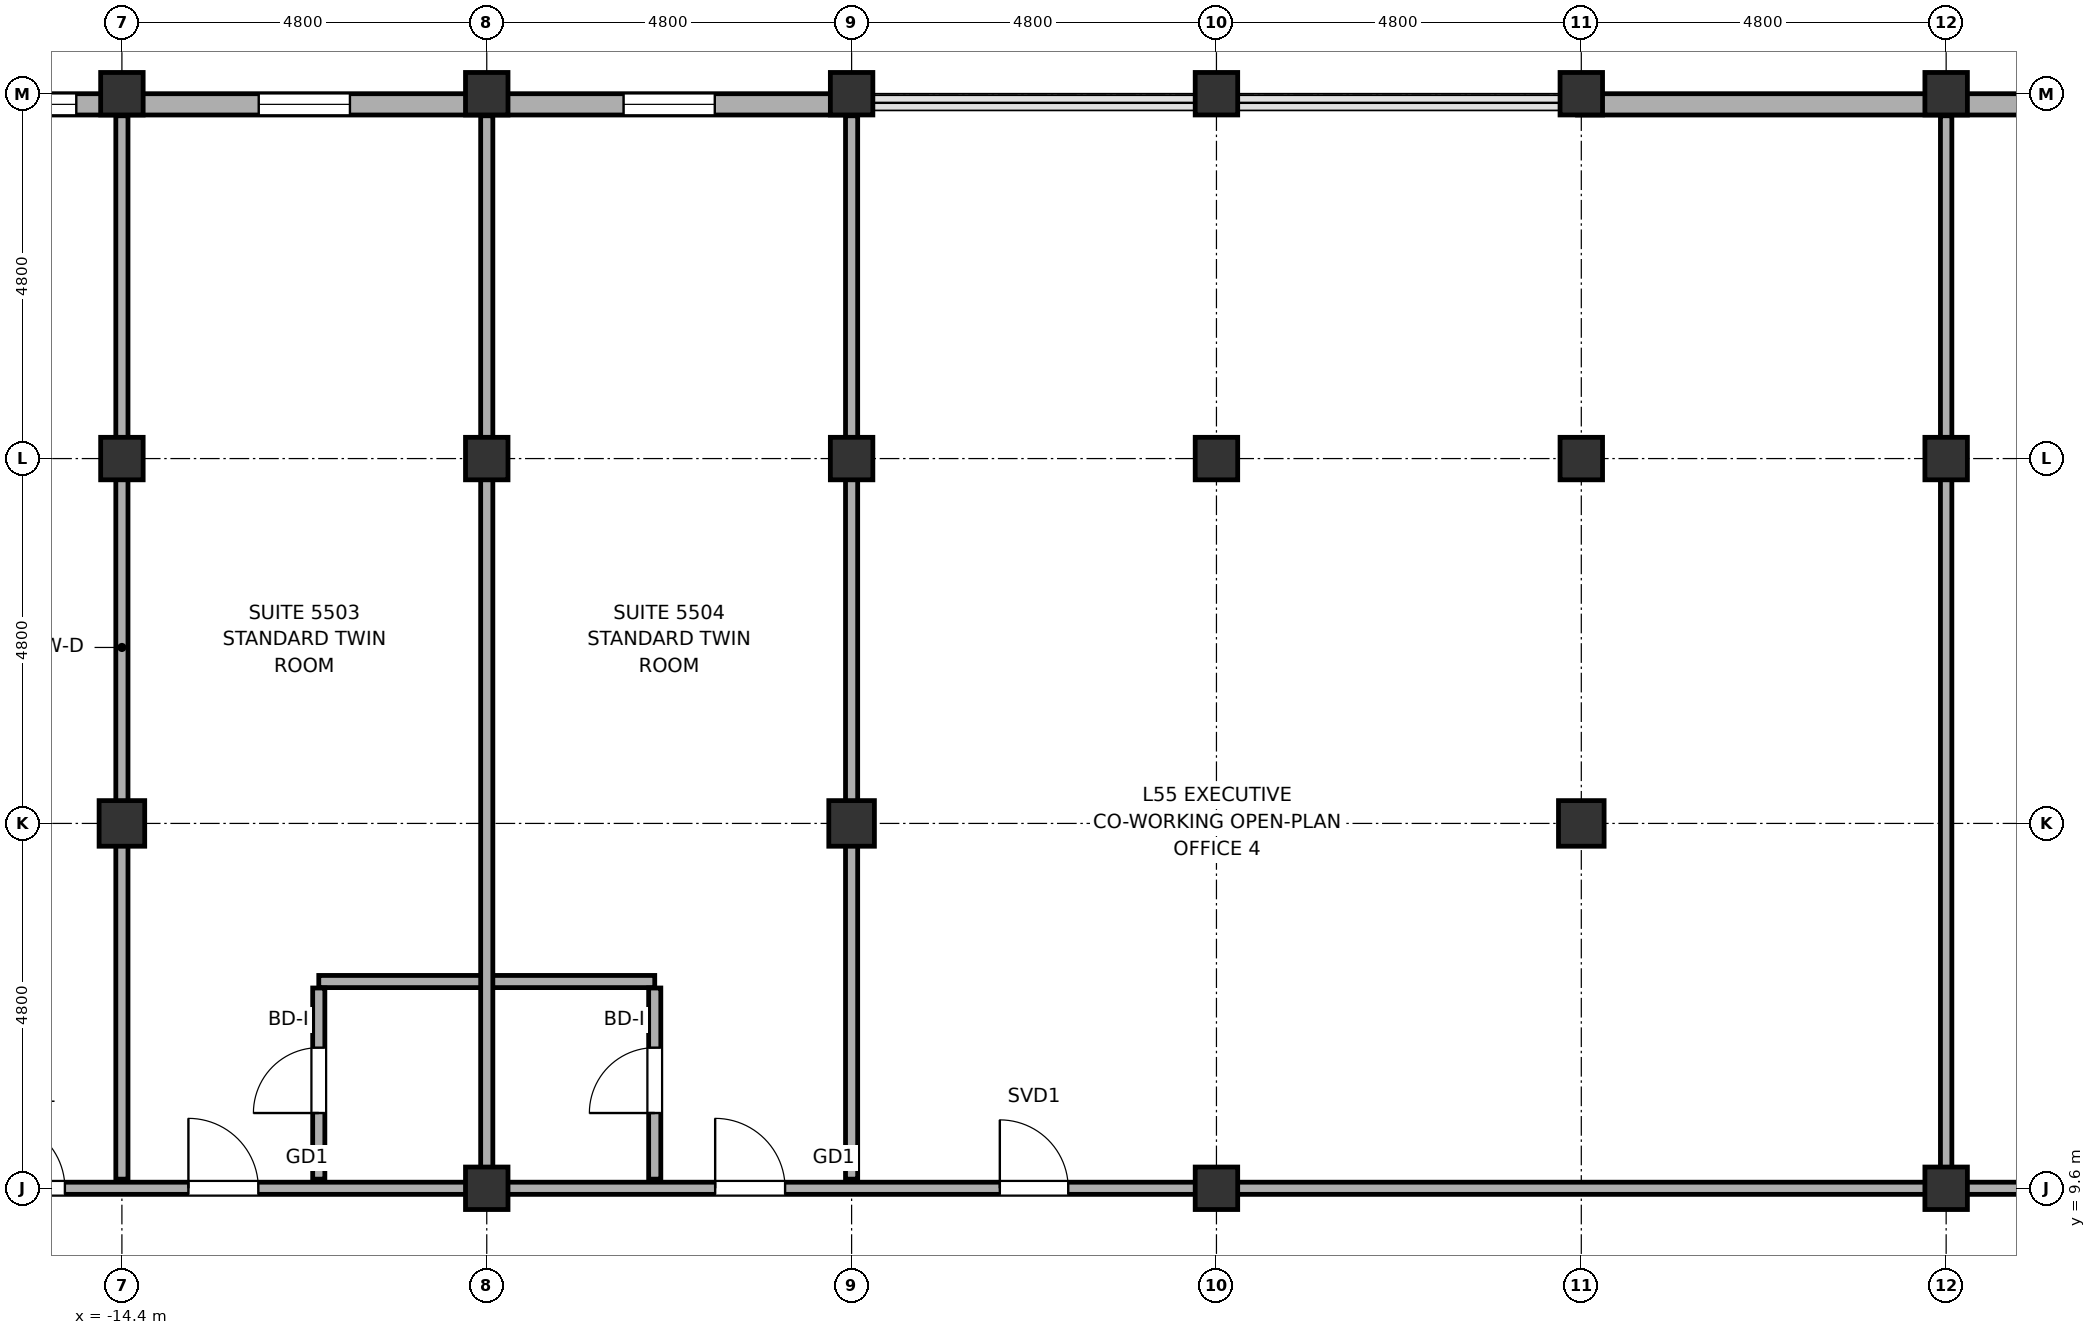
"""IFC4 building model, lengths in metres.
Left out: names, types, materials, properties, quantities, classifications, styles, units other than length and angle.
Written with IfcOpenShell. Run it as: python <this file> out.ifc"""

import sys

from ifc_helpers import new_model, si_unit, direction, frame, frame_2d, origin, origin_2d, place, context, subcontext, project, spatial, rectangle, hollow_rectangle, hollow_circle, extrude, element, fill, save


model = new_model("IFC4")
c1 = context("Model", 3, precision=1e-05, world=origin(), true_north=direction((0.0, 1.0)))
c2 = subcontext(c1, "Body", "Model", "MODEL_VIEW")
j1 = project(units=[si_unit("LENGTHUNIT", "METRE"), si_unit("PLANEANGLEUNIT", "RADIAN")], contexts=[c1])
p1 = place(None, origin())
s1 = spatial("IfcSite", under=j1, at=p1, CompositionType="ELEMENT")
p2 = place(p1, origin())
s2 = spatial("IfcBuilding", under=s1, at=p2, CompositionType="ELEMENT")
p3 = place(p2, frame((0.0, 0.0, 222.3)))
s3 = spatial("IfcBuildingStorey", under=s2, at=p3, CompositionType="ELEMENT", Elevation=222.3)
p4 = place(p3, frame((-14.4, 14.4, 0.0), z_axis=(0.0, 0.0, 1.0), x_axis=(1.0, 0.0, 0.0)))
e1 = element("IfcColumn", 1, at=p4, inside=s3, PredefinedType="COLUMN", context=c2, shape_type="SweptSolid", body=[
    extrude(hollow_rectangle(XDim=0.6, YDim=0.6, WallThickness=0.028, at=origin_2d()), origin(), (0.0, 0.0, 1.0), 3.85),
])
p5 = place(p3, frame((-14.4, 19.2, 0.0), z_axis=(0.0, 0.0, 1.0), x_axis=(1.0, 0.0, 0.0)))
e2 = element("IfcColumn", 2, at=p5, inside=s3, PredefinedType="COLUMN", context=c2, shape_type="SweptSolid", body=[
    extrude(hollow_circle(Radius=0.28, WallThickness=0.025, at=origin_2d()), origin(), (0.0, 0.0, 1.0), 3.85),
])
p6 = place(p3, frame((-14.4, 24.0, -0.18), z_axis=(0.0, 0.0, 1.0), x_axis=(1.0, 0.0, 0.0)))
e3 = element("IfcColumn", 3, at=p6, inside=s3, PredefinedType="COLUMN", context=c2, shape_type="SweptSolid", body=[
    extrude(hollow_circle(Radius=0.28, WallThickness=0.025, at=origin_2d()), origin(), (0.0, 0.0, 1.0), 4.03),
])
for number, where, z_axis, x_axis in (
    (4, (-9.6, 9.6, 0.0), (0.0, 0.0, 1.0), (1.0, 0.0, 0.0)),
    (5, (-9.6, 19.2, 0.0), (0.0, 0.0, 1.0), (1.0, 0.0, 0.0)),
):
    element("IfcColumn", number, at=place(p3, frame(where, z_axis=z_axis, x_axis=x_axis)), inside=s3, PredefinedType="COLUMN", context=c2, shape_type="SweptSolid", body=[
        extrude(hollow_circle(Radius=0.28, WallThickness=0.025, at=origin_2d()), origin(), (0.0, 0.0, 1.0), 3.85),
    ])
p7 = place(p3, frame((-9.6, 24.0, -0.18), z_axis=(0.0, 0.0, 1.0), x_axis=(1.0, 0.0, 0.0)))
e6 = element("IfcColumn", 6, at=p7, inside=s3, PredefinedType="COLUMN", context=c2, shape_type="SweptSolid", body=[
    extrude(hollow_circle(Radius=0.28, WallThickness=0.025, at=origin_2d()), origin(), (0.0, 0.0, 1.0), 4.03),
])
p8 = place(p3, frame((-4.8, 14.4, 0.0), z_axis=(0.0, 0.0, 1.0), x_axis=(1.0, 0.0, 0.0)))
e7 = element("IfcColumn", 7, at=p8, inside=s3, PredefinedType="COLUMN", context=c2, shape_type="SweptSolid", body=[
    extrude(hollow_rectangle(XDim=0.6, YDim=0.6, WallThickness=0.028, at=origin_2d()), origin(), (0.0, 0.0, 1.0), 3.85),
])
p9 = place(p3, frame((-4.8, 19.2, 0.0), z_axis=(0.0, 0.0, 1.0), x_axis=(1.0, 0.0, 0.0)))
e8 = element("IfcColumn", 8, at=p9, inside=s3, PredefinedType="COLUMN", context=c2, shape_type="SweptSolid", body=[
    extrude(hollow_circle(Radius=0.28, WallThickness=0.025, at=origin_2d()), origin(), (0.0, 0.0, 1.0), 3.85),
])
p10 = place(p3, frame((-4.8, 24.0, -0.18), z_axis=(0.0, 0.0, 1.0), x_axis=(1.0, 0.0, 0.0)))
e9 = element("IfcColumn", 9, at=p10, inside=s3, PredefinedType="COLUMN", context=c2, shape_type="SweptSolid", body=[
    extrude(hollow_circle(Radius=0.28, WallThickness=0.025, at=origin_2d()), origin(), (0.0, 0.0, 1.0), 4.03),
])
for number, where, z_axis, x_axis in (
    (10, (0.0, 9.6, 0.0), (0.0, 0.0, 1.0), (1.0, 0.0, 0.0)),
    (11, (0.0, 19.2, 0.0), (0.0, 0.0, 1.0), (1.0, 0.0, 0.0)),
):
    element("IfcColumn", number, at=place(p3, frame(where, z_axis=z_axis, x_axis=x_axis)), inside=s3, PredefinedType="COLUMN", context=c2, shape_type="SweptSolid", body=[
        extrude(hollow_circle(Radius=0.28, WallThickness=0.025, at=origin_2d()), origin(), (0.0, 0.0, 1.0), 3.85),
    ])
p11 = place(p3, frame((0.0, 24.0, -0.18), z_axis=(0.0, 0.0, 1.0), x_axis=(1.0, 0.0, 0.0)))
e12 = element("IfcColumn", 12, at=p11, inside=s3, PredefinedType="COLUMN", context=c2, shape_type="SweptSolid", body=[
    extrude(hollow_circle(Radius=0.28, WallThickness=0.025, at=origin_2d()), origin(), (0.0, 0.0, 1.0), 4.03),
])
p12 = place(p3, frame((4.8, 14.4, 0.0), z_axis=(0.0, 0.0, 1.0), x_axis=(1.0, 0.0, 0.0)))
e13 = element("IfcColumn", 13, at=p12, inside=s3, PredefinedType="COLUMN", context=c2, shape_type="SweptSolid", body=[
    extrude(hollow_rectangle(XDim=0.6, YDim=0.6, WallThickness=0.028, at=origin_2d()), origin(), (0.0, 0.0, 1.0), 3.85),
])
p13 = place(p3, frame((4.8, 19.2, 0.0), z_axis=(0.0, 0.0, 1.0), x_axis=(1.0, 0.0, 0.0)))
e14 = element("IfcColumn", 14, at=p13, inside=s3, PredefinedType="COLUMN", context=c2, shape_type="SweptSolid", body=[
    extrude(hollow_circle(Radius=0.28, WallThickness=0.025, at=origin_2d()), origin(), (0.0, 0.0, 1.0), 3.85),
])
p14 = place(p3, frame((4.8, 24.0, -0.18), z_axis=(0.0, 0.0, 1.0), x_axis=(1.0, 0.0, 0.0)))
e15 = element("IfcColumn", 15, at=p14, inside=s3, PredefinedType="COLUMN", context=c2, shape_type="SweptSolid", body=[
    extrude(hollow_circle(Radius=0.28, WallThickness=0.025, at=origin_2d()), origin(), (0.0, 0.0, 1.0), 4.03),
])
for number, where, z_axis, x_axis in (
    (16, (9.6, 9.6, 0.0), (0.0, 0.0, 1.0), (1.0, 0.0, 0.0)),
    (17, (9.6, 19.2, 0.0), (0.0, 0.0, 1.0), (1.0, 0.0, 0.0)),
):
    element("IfcColumn", number, at=place(p3, frame(where, z_axis=z_axis, x_axis=x_axis)), inside=s3, PredefinedType="COLUMN", context=c2, shape_type="SweptSolid", body=[
        extrude(hollow_circle(Radius=0.28, WallThickness=0.025, at=origin_2d()), origin(), (0.0, 0.0, 1.0), 3.85),
    ])
p15 = place(p3, frame((9.6, 24.0, -0.18), z_axis=(0.0, 0.0, 1.0), x_axis=(1.0, 0.0, 0.0)))
e18 = element("IfcColumn", 18, at=p15, inside=s3, PredefinedType="COLUMN", context=c2, shape_type="SweptSolid", body=[
    extrude(hollow_circle(Radius=0.28, WallThickness=0.025, at=origin_2d()), origin(), (0.0, 0.0, 1.0), 4.03),
])
p16 = place(p3, frame((-25.2, 23.86, 0.0), z_axis=(0.0, 0.0, 1.0), x_axis=(1.0, 0.0, 0.0)))
e19 = element("IfcWall", 19, at=p16, inside=s3, PredefinedType="SOLIDWALL", context=c2, shape_type="SweptSolid", body=[
    extrude(rectangle(XDim=20.45, YDim=0.28, at=frame_2d((10.225, 0.0))), origin(), (0.0, 0.0, 1.0), 2.27),
])
p17 = place(p16, frame((9.0, 0.0, 0.75)))
e20 = element("IfcOpeningElement", 20, at=p17, cuts=e19, PredefinedType="OPENING", context=c2, shape_type="SweptSolid", body=[
    extrude(rectangle(XDim=1.2, YDim=1.15, at=frame_2d((0.6, 0.575))), frame((0.0, 0.155, 0.0), z_axis=(0.0, -1.0, 0.0), x_axis=(1.0, 0.0, 0.0)), (0.0, 0.0, 1.0), 0.31),
])
p18 = place(p16, frame((12.6, 0.0, 0.75)))
e21 = element("IfcOpeningElement", 21, at=p18, cuts=e19, PredefinedType="OPENING", context=c2, shape_type="SweptSolid", body=[
    extrude(rectangle(XDim=1.2, YDim=1.15, at=frame_2d((0.6, 0.575))), frame((0.0, 0.155, 0.0), z_axis=(0.0, -1.0, 0.0), x_axis=(1.0, 0.0, 0.0)), (0.0, 0.0, 1.0), 0.31),
])
p19 = place(p16, frame((17.4, 0.0, 0.75)))
e22 = element("IfcOpeningElement", 22, at=p19, cuts=e19, PredefinedType="OPENING", context=c2, shape_type="SweptSolid", body=[
    extrude(rectangle(XDim=1.2, YDim=1.15, at=frame_2d((0.6, 0.575))), frame((0.0, 0.155, 0.0), z_axis=(0.0, -1.0, 0.0), x_axis=(1.0, 0.0, 0.0)), (0.0, 0.0, 1.0), 0.31),
])
p20 = place(p3, frame((4.75, 23.86, 0.0), z_axis=(0.0, 0.0, 1.0), x_axis=(1.0, 0.0, 0.0)))
e23 = element("IfcWall", 23, at=p20, inside=s3, PredefinedType="SOLIDWALL", context=c2, shape_type="SweptSolid", body=[
    extrude(rectangle(XDim=25.25, YDim=0.28, at=frame_2d((12.625, 0.0))), origin(), (0.0, 0.0, 1.0), 2.27),
])
p21 = place(p20, frame((16.25, 0.0, 0.75)))
e24 = element("IfcOpeningElement", 24, at=p21, cuts=e23, PredefinedType="OPENING", context=c2, shape_type="SweptSolid", body=[
    extrude(rectangle(XDim=1.2, YDim=1.15, at=frame_2d((0.6, 0.575))), frame((0.0, 0.155, 0.0), z_axis=(0.0, -1.0, 0.0), x_axis=(1.0, 0.0, 0.0)), (0.0, 0.0, 1.0), 0.31),
])
p22 = place(p20, frame((7.684, 0.0, 0.75)))
e25 = element("IfcOpeningElement", 25, at=p22, cuts=e23, PredefinedType="OPENING", context=c2, shape_type="SweptSolid", body=[
    extrude(rectangle(XDim=1.2, YDim=1.15, at=frame_2d((0.6, 0.575))), frame((0.0, 0.155, 0.0), z_axis=(0.0, -1.0, 0.0), x_axis=(1.0, 0.0, 0.0)), (0.0, 0.0, 1.0), 0.31),
])
p23 = place(p3, frame((-23.92, 9.6, 0.0), z_axis=(0.0, 0.0, 1.0), x_axis=(1.0, 0.0, 0.0)))
e26 = element("IfcWall", 26, at=p23, inside=s3, PredefinedType="PARTITIONING", context=c2, shape_type="SweptSolid", body=[
    extrude(rectangle(XDim=47.84, YDim=0.16, at=frame_2d((23.92, 0.0))), origin(), (0.0, 0.0, 1.0), 2.27),
])
p24 = place(p23, frame((1.87, 0.0, 0.0)))
e27 = element("IfcOpeningElement", 27, at=p24, cuts=e26, PredefinedType="OPENING", context=c2, shape_type="SweptSolid", body=[
    extrude(rectangle(XDim=0.9, YDim=2.1, at=frame_2d((0.45, 1.05))), frame((0.0, 0.095, 0.0), z_axis=(0.0, -1.0, 0.0), x_axis=(1.0, 0.0, 0.0)), (0.0, 0.0, 1.0), 0.19),
])
p25 = place(p23, frame((45.07, 0.0, 0.0)))
e28 = element("IfcOpeningElement", 28, at=p25, cuts=e26, PredefinedType="OPENING", context=c2, shape_type="SweptSolid", body=[
    extrude(rectangle(XDim=0.9, YDim=2.1, at=frame_2d((0.45, 1.05))), frame((0.0, 0.095, 0.0), z_axis=(0.0, -1.0, 0.0), x_axis=(1.0, 0.0, 0.0)), (0.0, 0.0, 1.0), 0.19),
])
p26 = place(p23, frame((5.98, 0.0, 0.0)))
e29 = element("IfcOpeningElement", 29, at=p26, cuts=e26, PredefinedType="OPENING", context=c2, shape_type="SweptSolid", body=[
    extrude(rectangle(XDim=0.9, YDim=2.1, at=frame_2d((0.45, 1.05))), frame((0.0, 0.095, 0.0), z_axis=(0.0, -1.0, 0.0), x_axis=(1.0, 0.0, 0.0)), (0.0, 0.0, 1.0), 0.19),
])
p27 = place(p23, frame((7.87, 0.0, 0.0)))
e30 = element("IfcOpeningElement", 30, at=p27, cuts=e26, PredefinedType="OPENING", context=c2, shape_type="SweptSolid", body=[
    extrude(rectangle(XDim=0.9, YDim=2.1, at=frame_2d((0.45, 1.05))), frame((0.0, 0.095, 0.0), z_axis=(0.0, -1.0, 0.0), x_axis=(1.0, 0.0, 0.0)), (0.0, 0.0, 1.0), 0.19),
])
p28 = place(p23, frame((10.395, 0.0, 0.0)))
e31 = element("IfcOpeningElement", 31, at=p28, cuts=e26, PredefinedType="OPENING", context=c2, shape_type="SweptSolid", body=[
    extrude(rectangle(XDim=0.92, YDim=2.15, at=frame_2d((0.46, 1.075))), frame((0.0, 0.095, 0.0), z_axis=(0.0, -1.0, 0.0), x_axis=(1.0, 0.0, 0.0)), (0.0, 0.0, 1.0), 0.19),
])
p29 = place(p23, frame((17.325, 0.0, 0.0)))
e32 = element("IfcOpeningElement", 32, at=p29, cuts=e26, PredefinedType="OPENING", context=c2, shape_type="SweptSolid", body=[
    extrude(rectangle(XDim=0.92, YDim=2.15, at=frame_2d((0.46, 1.075))), frame((0.0, 0.095, 0.0), z_axis=(0.0, -1.0, 0.0), x_axis=(1.0, 0.0, 0.0)), (0.0, 0.0, 1.0), 0.19),
])
p30 = place(p23, frame((21.07, 0.0, 0.0)))
e33 = element("IfcOpeningElement", 33, at=p30, cuts=e26, PredefinedType="OPENING", context=c2, shape_type="SweptSolid", body=[
    extrude(rectangle(XDim=0.9, YDim=2.1, at=frame_2d((0.45, 1.05))), frame((0.0, 0.095, 0.0), z_axis=(0.0, -1.0, 0.0), x_axis=(1.0, 0.0, 0.0)), (0.0, 0.0, 1.0), 0.19),
])
p31 = place(p23, frame((35.47, 0.0, 0.0)))
e34 = element("IfcOpeningElement", 34, at=p31, cuts=e26, PredefinedType="OPENING", context=c2, shape_type="SweptSolid", body=[
    extrude(rectangle(XDim=0.9, YDim=2.1, at=frame_2d((0.45, 1.05))), frame((0.0, 0.095, 0.0), z_axis=(0.0, -1.0, 0.0), x_axis=(1.0, 0.0, 0.0)), (0.0, 0.0, 1.0), 0.19),
])
p32 = place(p3, frame((-11.81, 12.32, 0.0), z_axis=(0.0, 0.0, 1.0), x_axis=(1.0, 0.0, 0.0)))
e35 = element("IfcWall", 35, at=p32, inside=s3, PredefinedType="PARTITIONING", context=c2, shape_type="SweptSolid", body=[
    extrude(rectangle(XDim=4.42, YDim=0.16, at=frame_2d((2.21, 0.0))), origin(), (0.0, 0.0, 1.0), 3.31),
])
p33 = place(p3, frame((-14.4, 9.72, 0.0), z_axis=(0.0, 0.0, 1.0), x_axis=(0.0, 1.0, 0.0)))
e36 = element("IfcWall", 36, at=p33, inside=s3, PredefinedType="PARTITIONING", context=c2, shape_type="SweptSolid", body=[
    extrude(rectangle(XDim=13.99, YDim=0.16, at=frame_2d((6.995, 0.0))), origin(), (0.0, 0.0, 1.0), 2.27),
])
p34 = place(p3, frame((-11.81, 9.72, 0.0), z_axis=(0.0, 0.0, 1.0), x_axis=(0.0, 1.0, 0.0)))
e37 = element("IfcWall", 37, at=p34, inside=s3, PredefinedType="PARTITIONING", context=c2, shape_type="SweptSolid", body=[
    extrude(rectangle(XDim=2.515, YDim=0.16, at=frame_2d((1.258, 0.0))), origin(), (0.0, 0.0, 1.0), 2.27),
])
p35 = place(p34, frame((0.87, 0.0, 0.0)))
e38 = element("IfcOpeningElement", 38, at=p35, cuts=e37, PredefinedType="OPENING", context=c2, shape_type="SweptSolid", body=[
    extrude(rectangle(XDim=0.86, YDim=2.1, at=frame_2d((0.43, 1.05))), frame((0.0, 0.095, 0.0), z_axis=(0.0, -1.0, 0.0), x_axis=(1.0, 0.0, 0.0)), (0.0, 0.0, 1.0), 0.19),
])
p36 = place(p3, frame((-9.6, 9.72, 0.0), z_axis=(0.0, 0.0, 1.0), x_axis=(0.0, 1.0, 0.0)))
e39 = element("IfcWall", 39, at=p36, inside=s3, PredefinedType="PARTITIONING", context=c2, shape_type="SweptSolid", body=[
    extrude(rectangle(XDim=13.99, YDim=0.16, at=frame_2d((6.995, 0.0))), origin(), (0.0, 0.0, 1.0), 2.27),
])
p37 = place(p3, frame((-7.39, 9.72, 0.0), z_axis=(0.0, 0.0, 1.0), x_axis=(0.0, 1.0, 0.0)))
e40 = element("IfcWall", 40, at=p37, inside=s3, PredefinedType="PARTITIONING", context=c2, shape_type="SweptSolid", body=[
    extrude(rectangle(XDim=2.515, YDim=0.16, at=frame_2d((1.258, 0.0))), origin(), (0.0, 0.0, 1.0), 2.27),
])
p38 = place(p37, frame((0.87, 0.0, 0.0)))
e41 = element("IfcOpeningElement", 41, at=p38, cuts=e40, PredefinedType="OPENING", context=c2, shape_type="SweptSolid", body=[
    extrude(rectangle(XDim=0.86, YDim=2.1, at=frame_2d((0.43, 1.05))), frame((0.0, 0.095, 0.0), z_axis=(0.0, -1.0, 0.0), x_axis=(1.0, 0.0, 0.0)), (0.0, 0.0, 1.0), 0.19),
])
p39 = place(p3, frame((-4.8, 9.72, 0.0), z_axis=(0.0, 0.0, 1.0), x_axis=(0.0, 1.0, 0.0)))
e42 = element("IfcWall", 42, at=p39, inside=s3, PredefinedType="PARTITIONING", context=c2, shape_type="SweptSolid", body=[
    extrude(rectangle(XDim=13.99, YDim=0.16, at=frame_2d((6.995, 0.0))), origin(), (0.0, 0.0, 1.0), 2.27),
])
p40 = place(p3, frame((9.6, 9.72, 0.0), z_axis=(0.0, 0.0, 1.0), x_axis=(0.0, 1.0, 0.0)))
e43 = element("IfcWall", 43, at=p40, inside=s3, PredefinedType="PARTITIONING", context=c2, shape_type="SweptSolid", body=[
    extrude(rectangle(XDim=13.99, YDim=0.15, at=frame_2d((6.995, 0.0))), origin(), (0.0, 0.0, 1.0), 2.27),
])
p41 = place(p17, origin())
e44 = element("IfcWindow", 44, at=p41, inside=s3, PartitioningType="SINGLE_PANEL", PredefinedType="WINDOW", context=c2, shape_type="SweptSolid", body=[
    extrude(rectangle(XDim=1.2, YDim=1.15, at=frame_2d((0.6, 0.575))), frame((0.0, 0.03, 0.0), z_axis=(0.0, -1.0, 0.0), x_axis=(1.0, 0.0, 0.0)), (0.0, 0.0, 1.0), 0.06),
])
fill(e20, e44)
p42 = place(p18, origin())
e45 = element("IfcWindow", 45, at=p42, inside=s3, PartitioningType="SINGLE_PANEL", PredefinedType="WINDOW", context=c2, shape_type="SweptSolid", body=[
    extrude(rectangle(XDim=1.2, YDim=1.15, at=frame_2d((0.6, 0.575))), frame((0.0, 0.03, 0.0), z_axis=(0.0, -1.0, 0.0), x_axis=(1.0, 0.0, 0.0)), (0.0, 0.0, 1.0), 0.06),
])
fill(e21, e45)
p43 = place(p19, origin())
e46 = element("IfcWindow", 46, at=p43, inside=s3, PartitioningType="SINGLE_PANEL", PredefinedType="WINDOW", context=c2, shape_type="SweptSolid", body=[
    extrude(rectangle(XDim=1.2, YDim=1.15, at=frame_2d((0.6, 0.575))), frame((0.0, 0.03, 0.0), z_axis=(0.0, -1.0, 0.0), x_axis=(1.0, 0.0, 0.0)), (0.0, 0.0, 1.0), 0.06),
])
fill(e22, e46)
p44 = place(p27, origin())
e47 = element("IfcDoor", 47, at=p44, inside=s3, OperationType="SINGLE_SWING_RIGHT", PredefinedType="DOOR", context=c2, shape_type="SweptSolid", body=[
    extrude(rectangle(XDim=0.9, YDim=2.1, at=frame_2d((0.45, 1.05))), frame((0.0, 0.025, 0.0), z_axis=(0.0, -1.0, 0.0), x_axis=(1.0, 0.0, 0.0)), (0.0, 0.0, 1.0), 0.05),
])
fill(e30, e47)
p45 = place(p28, origin())
e48 = element("IfcDoor", 48, at=p45, inside=s3, OperationType="SINGLE_SWING_LEFT", PredefinedType="DOOR", context=c2, shape_type="SweptSolid", body=[
    extrude(rectangle(XDim=0.92, YDim=2.15, at=frame_2d((0.46, 1.075))), frame((0.0, 0.025, 0.0), z_axis=(0.0, -1.0, 0.0), x_axis=(1.0, 0.0, 0.0)), (0.0, 0.0, 1.0), 0.05),
])
fill(e31, e48)
p46 = place(p35, origin())
e49 = element("IfcDoor", 49, at=p46, inside=s3, OperationType="SINGLE_SWING_LEFT", PredefinedType="DOOR", context=c2, shape_type="SweptSolid", body=[
    extrude(rectangle(XDim=0.86, YDim=2.1, at=frame_2d((0.43, 1.05))), frame((0.0, 0.025, 0.0), z_axis=(0.0, -1.0, 0.0), x_axis=(1.0, 0.0, 0.0)), (0.0, 0.0, 1.0), 0.05),
])
fill(e38, e49)
p47 = place(p29, origin())
e50 = element("IfcDoor", 50, at=p47, inside=s3, OperationType="SINGLE_SWING_LEFT", PredefinedType="DOOR", context=c2, shape_type="SweptSolid", body=[
    extrude(rectangle(XDim=0.92, YDim=2.15, at=frame_2d((0.46, 1.075))), frame((0.0, 0.025, 0.0), z_axis=(0.0, -1.0, 0.0), x_axis=(1.0, 0.0, 0.0)), (0.0, 0.0, 1.0), 0.05),
])
fill(e32, e50)
p48 = place(p38, origin())
e51 = element("IfcDoor", 51, at=p48, inside=s3, OperationType="SINGLE_SWING_LEFT", PredefinedType="DOOR", context=c2, shape_type="SweptSolid", body=[
    extrude(rectangle(XDim=0.86, YDim=2.1, at=frame_2d((0.43, 1.05))), frame((0.0, 0.025, 0.0), z_axis=(0.0, -1.0, 0.0), x_axis=(1.0, 0.0, 0.0)), (0.0, 0.0, 1.0), 0.05),
])
fill(e41, e51)
p49 = place(p30, origin())
e52 = element("IfcDoor", 52, at=p49, inside=s3, OperationType="SINGLE_SWING_LEFT", PredefinedType="DOOR", context=c2, shape_type="SweptSolid", body=[
    extrude(rectangle(XDim=0.9, YDim=2.1, at=frame_2d((0.45, 1.05))), frame((0.0, 0.025, 0.0), z_axis=(0.0, -1.0, 0.0), x_axis=(1.0, 0.0, 0.0)), (0.0, 0.0, 1.0), 0.05),
])
fill(e33, e52)
save(model, sys.argv[1])
